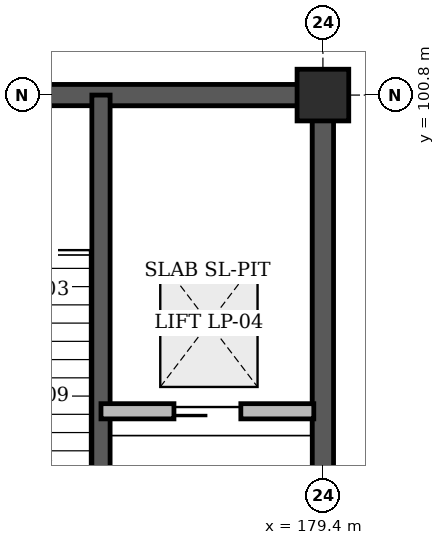
"""IFC4 building model, lengths in metres.
Left out: names, types, materials, properties, quantities, classifications, styles, units other than length and angle.
Written with IfcOpenShell. Run it as: python <this file> out.ifc"""

import sys

from ifc_helpers import new_model, si_unit, direction, frame, frame_2d, origin, origin_2d, place, context, subcontext, project, spatial, rectangle, extrude, element, fill, save


model = new_model("IFC4")
c1 = context("Model", 3, precision=1e-05, world=origin(), true_north=direction((0.0, 1.0)))
c2 = subcontext(c1, "Body", "Model", "MODEL_VIEW")
j1 = project(units=[si_unit("LENGTHUNIT", "METRE"), si_unit("PLANEANGLEUNIT", "RADIAN")], contexts=[c1])
p1 = place(None, origin())
s1 = spatial("IfcSite", under=j1, at=p1, CompositionType="ELEMENT")
p2 = place(p1, origin())
s2 = spatial("IfcBuilding", under=s1, at=p2, CompositionType="ELEMENT")
p3 = place(p2, frame((0.0, 0.0, -4.8)))
s3 = spatial("IfcBuildingStorey", under=s2, at=p3, CompositionType="ELEMENT", Elevation=-4.8)
p4 = place(p3, frame((171.425, 100.8, 0.0), z_axis=(0.0, 0.0, 1.0), x_axis=(1.0, 0.0, 0.0)))
e1 = element("IfcWall", 1, at=p4, inside=s3, PredefinedType="SHEAR", context=c2, shape_type="SweptSolid", body=[
    extrude(rectangle(XDim=8.15, YDim=0.35, at=frame_2d((4.075, 0.0))), origin(), (0.0, 0.0, 1.0), 4.4),
])
p5 = place(p3, frame((179.4, 92.4, 0.0), z_axis=(0.0, 0.0, 1.0), x_axis=(0.0, 1.0, 0.0)))
e2 = element("IfcWall", 2, at=p5, inside=s3, PredefinedType="SHEAR", context=c2, shape_type="SweptSolid", body=[
    extrude(rectangle(XDim=8.4, YDim=0.35, at=frame_2d((4.2, 0.0))), origin(), (0.0, 0.0, 1.0), 4.4),
])
p6 = place(p3, frame((179.4, 100.8, 0.0), z_axis=(0.0, 0.0, 1.0), x_axis=(1.0, 0.0, 0.0)))
e3 = element("IfcColumn", 3, at=p6, inside=s3, PredefinedType="COLUMN", context=c2, shape_type="SweptSolid", body=[
    extrude(rectangle(XDim=0.85, YDim=0.85, at=origin_2d()), origin(), (0.0, 0.0, 1.0), 4.8),
])
p7 = place(p3, frame((175.75, 92.4, 0.0), z_axis=(0.0, 0.0, 1.0), x_axis=(0.0, 1.0, 0.0)))
e4 = element("IfcWall", 4, at=p7, inside=s3, PredefinedType="SHEAR", context=c2, shape_type="SweptSolid", body=[
    extrude(rectangle(XDim=8.4, YDim=0.3, at=frame_2d((4.2, 0.0))), origin(), (0.0, 0.0, 1.0), 4.8),
])
p8 = place(p3, frame((175.75, 95.6, 0.0), z_axis=(0.0, 0.0, 1.0), x_axis=(1.0, 0.0, 0.0)))
e5 = element("IfcWall", 5, at=p8, inside=s3, PredefinedType="STANDARD", context=c2, shape_type="SweptSolid", body=[
    extrude(rectangle(XDim=3.5, YDim=0.25, at=frame_2d((1.75, 0.0))), origin(), (0.0, 0.0, 1.0), 4.46),
])
p9 = place(p8, frame((1.2, 0.0, 0.0)))
e6 = element("IfcOpeningElement", 6, at=p9, cuts=e5, PredefinedType="OPENING", context=c2, shape_type="SweptSolid", body=[
    extrude(rectangle(XDim=1.1, YDim=2.2, at=frame_2d((0.55, 1.1))), frame((0.0, 0.135, 0.0), z_axis=(0.0, -1.0, 0.0), x_axis=(1.0, 0.0, 0.0)), (0.0, 0.0, 1.0), 0.27),
])
p10 = place(p9, origin())
e7 = element("IfcDoor", 7, at=p10, inside=s3, OperationType="SLIDING_TO_LEFT", PredefinedType="DOOR", context=c2, shape_type="SweptSolid", body=[
    extrude(rectangle(XDim=1.1, YDim=2.2, at=frame_2d((0.55, 1.1))), frame((0.0, 0.025, 0.0), z_axis=(0.0, -1.0, 0.0), x_axis=(1.0, 0.0, 0.0)), (0.0, 0.0, 1.0), 0.05),
])
fill(e6, e7)
save(model, sys.argv[1])
